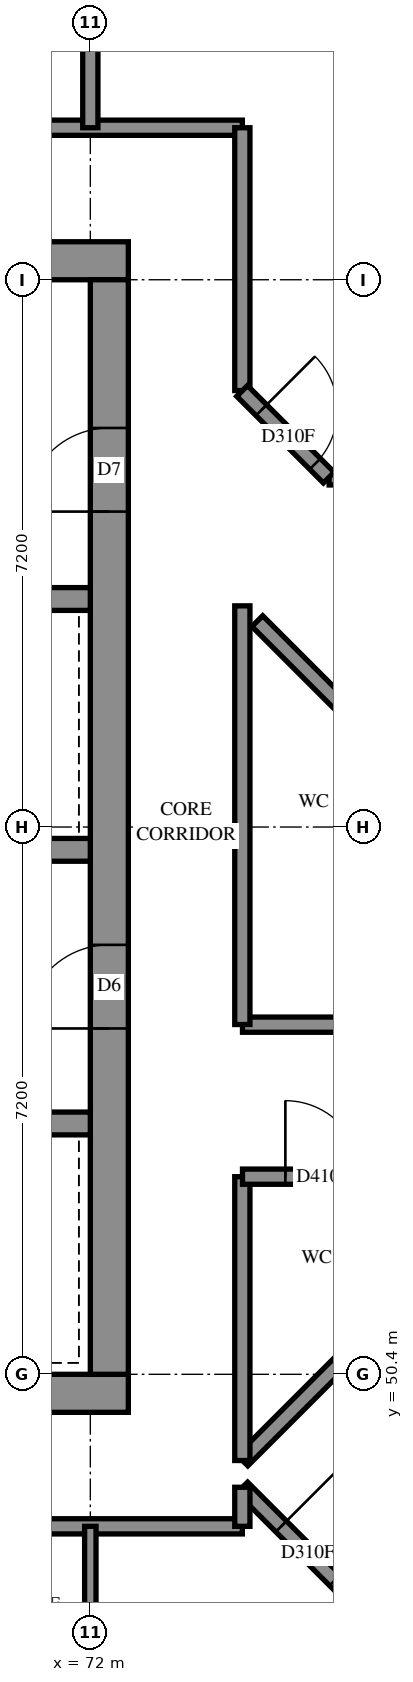
"""IFC4 building model, lengths in metres.
Left out: names, types, materials, properties, quantities, classifications, styles, units other than length and angle.
Written with IfcOpenShell. Run it as: python <this file> out.ifc"""

import sys

from ifc_helpers import new_model, si_unit, direction, frame, frame_2d, origin, place, context, subcontext, project, spatial, rectangle, extrude, element, fill, save


model = new_model("IFC4")
c1 = context("Model", 3, precision=1e-05, world=origin(), true_north=direction((0.0, 1.0)))
c2 = subcontext(c1, "Body", "Model", "MODEL_VIEW")
j1 = project(units=[si_unit("LENGTHUNIT", "METRE"), si_unit("PLANEANGLEUNIT", "RADIAN")], contexts=[c1])
p1 = place(None, origin())
s1 = spatial("IfcSite", under=j1, at=p1, CompositionType="ELEMENT")
p2 = place(p1, origin())
s2 = spatial("IfcBuilding", under=s1, at=p2, CompositionType="ELEMENT")
p3 = place(p2, frame((0.0, 0.0, 193.0)))
s3 = spatial("IfcBuildingStorey", under=s2, at=p3, CompositionType="ELEMENT", Elevation=193.0)
p4 = place(p3, frame((57.1, 50.15, -0.3), z_axis=(0.0, 0.0, 1.0), x_axis=(1.0, 0.0, 0.0)))
e1 = element("IfcWall", 1, at=p4, inside=s3, PredefinedType="SHEAR", context=c2, shape_type="SweptSolid", body=[
    extrude(rectangle(XDim=15.4, YDim=0.5, at=frame_2d((7.7, 0.0))), origin(), (0.0, 0.0, 1.0), 2.7),
])
p5 = place(p3, frame((57.1, 65.05, -0.3), z_axis=(0.0, 0.0, 1.0), x_axis=(1.0, 0.0, 0.0)))
e2 = element("IfcWall", 2, at=p5, inside=s3, PredefinedType="SHEAR", context=c2, shape_type="SweptSolid", body=[
    extrude(rectangle(XDim=15.4, YDim=0.5, at=frame_2d((7.7, 0.0))), origin(), (0.0, 0.0, 1.0), 2.7),
])
p6 = place(p5, frame((10.5, 0.0, 0.3)))
e3 = element("IfcOpeningElement", 3, at=p6, cuts=e2, PredefinedType="OPENING", context=c2, shape_type="SweptSolid", body=[
    extrude(rectangle(XDim=0.8, YDim=2.1, at=frame_2d((0.4, 1.05))), frame((0.0, 0.26, 0.0), z_axis=(0.0, -1.0, 0.0), x_axis=(1.0, 0.0, 0.0)), (0.0, 0.0, 1.0), 0.52),
])
p7 = place(p3, frame((72.25, 50.4, -0.3), z_axis=(0.0, 0.0, 1.0), x_axis=(0.0, 1.0, 0.0)))
e4 = element("IfcWall", 4, at=p7, inside=s3, PredefinedType="SHEAR", context=c2, shape_type="SweptSolid", body=[
    extrude(rectangle(XDim=14.4, YDim=0.5, at=frame_2d((7.2, 0.0))), origin(), (0.0, 0.0, 1.0), 2.7),
])
p8 = place(p7, frame((4.55, 0.0, 0.3)))
e5 = element("IfcOpeningElement", 5, at=p8, cuts=e4, PredefinedType="OPENING", context=c2, shape_type="SweptSolid", body=[
    extrude(rectangle(XDim=1.1, YDim=2.1, at=frame_2d((0.55, 1.05))), frame((0.0, 0.26, 0.0), z_axis=(0.0, -1.0, 0.0), x_axis=(1.0, 0.0, 0.0)), (0.0, 0.0, 1.0), 0.52),
])
p9 = place(p7, frame((11.35, 0.0, 0.3)))
e6 = element("IfcOpeningElement", 6, at=p9, cuts=e4, PredefinedType="OPENING", context=c2, shape_type="SweptSolid", body=[
    extrude(rectangle(XDim=1.1, YDim=2.1, at=frame_2d((0.55, 1.05))), frame((0.0, 0.26, 0.0), z_axis=(0.0, -1.0, 0.0), x_axis=(1.0, 0.0, 0.0)), (0.0, 0.0, 1.0), 0.52),
])
p10 = place(p3, frame((57.6, 53.7, 0.0), z_axis=(0.0, 0.0, 1.0), x_axis=(1.0, 0.0, 0.0)))
e7 = element("IfcWall", 7, at=p10, inside=s3, PredefinedType="SOLIDWALL", context=c2, shape_type="SweptSolid", body=[
    extrude(rectangle(XDim=14.4, YDim=0.3, at=frame_2d((7.2, 0.0))), origin(), (0.0, 0.0, 1.0), 3.1),
])
p11 = place(p10, frame((1.35, 0.0, 0.0)))
e8 = element("IfcOpeningElement", 8, at=p11, cuts=e7, PredefinedType="OPENING", context=c2, shape_type="SweptSolid", body=[
    extrude(rectangle(XDim=0.9, YDim=2.1, at=frame_2d((0.45, 1.05))), frame((0.0, 0.16, 0.0), z_axis=(0.0, -1.0, 0.0), x_axis=(1.0, 0.0, 0.0)), (0.0, 0.0, 1.0), 0.32),
])
p12 = place(p10, frame((4.95, 0.0, 0.0)))
e9 = element("IfcOpeningElement", 9, at=p12, cuts=e7, PredefinedType="OPENING", context=c2, shape_type="SweptSolid", body=[
    extrude(rectangle(XDim=0.9, YDim=2.1, at=frame_2d((0.45, 1.05))), frame((0.0, 0.16, 0.0), z_axis=(0.0, -1.0, 0.0), x_axis=(1.0, 0.0, 0.0)), (0.0, 0.0, 1.0), 0.32),
])
p13 = place(p10, frame((8.55, 0.0, 0.0)))
e10 = element("IfcOpeningElement", 10, at=p13, cuts=e7, PredefinedType="OPENING", context=c2, shape_type="SweptSolid", body=[
    extrude(rectangle(XDim=0.9, YDim=2.1, at=frame_2d((0.45, 1.05))), frame((0.0, 0.16, 0.0), z_axis=(0.0, -1.0, 0.0), x_axis=(1.0, 0.0, 0.0)), (0.0, 0.0, 1.0), 0.32),
])
p14 = place(p10, frame((12.05, 0.0, 0.0)))
e11 = element("IfcOpeningElement", 11, at=p14, cuts=e7, PredefinedType="OPENING", context=c2, shape_type="SweptSolid", body=[
    extrude(rectangle(XDim=1.1, YDim=2.1, at=frame_2d((0.55, 1.05))), frame((0.0, 0.16, 0.0), z_axis=(0.0, -1.0, 0.0), x_axis=(1.0, 0.0, 0.0)), (0.0, 0.0, 1.0), 0.32),
])
p15 = place(p3, frame((57.6, 57.3, 0.0), z_axis=(0.0, 0.0, 1.0), x_axis=(1.0, 0.0, 0.0)))
e12 = element("IfcWall", 12, at=p15, inside=s3, PredefinedType="SOLIDWALL", context=c2, shape_type="SweptSolid", body=[
    extrude(rectangle(XDim=14.4, YDim=0.3, at=frame_2d((7.2, 0.0))), origin(), (0.0, 0.0, 1.0), 3.1),
])
p16 = place(p15, frame((1.25, 0.0, 0.0)))
e13 = element("IfcOpeningElement", 13, at=p16, cuts=e12, PredefinedType="OPENING", context=c2, shape_type="SweptSolid", body=[
    extrude(rectangle(XDim=1.1, YDim=2.1, at=frame_2d((0.55, 1.05))), frame((0.0, 0.16, 0.0), z_axis=(0.0, -1.0, 0.0), x_axis=(1.0, 0.0, 0.0)), (0.0, 0.0, 1.0), 0.32),
])
p17 = place(p15, frame((4.85, 0.0, 0.0)))
e14 = element("IfcOpeningElement", 14, at=p17, cuts=e12, PredefinedType="OPENING", context=c2, shape_type="SweptSolid", body=[
    extrude(rectangle(XDim=1.1, YDim=2.1, at=frame_2d((0.55, 1.05))), frame((0.0, 0.16, 0.0), z_axis=(0.0, -1.0, 0.0), x_axis=(1.0, 0.0, 0.0)), (0.0, 0.0, 1.0), 0.32),
])
p18 = place(p15, frame((8.45, 0.0, 0.0)))
e15 = element("IfcOpeningElement", 15, at=p18, cuts=e12, PredefinedType="OPENING", context=c2, shape_type="SweptSolid", body=[
    extrude(rectangle(XDim=1.1, YDim=2.1, at=frame_2d((0.55, 1.05))), frame((0.0, 0.16, 0.0), z_axis=(0.0, -1.0, 0.0), x_axis=(1.0, 0.0, 0.0)), (0.0, 0.0, 1.0), 0.32),
])
p19 = place(p15, frame((12.05, 0.0, 0.0)))
e16 = element("IfcOpeningElement", 16, at=p19, cuts=e12, PredefinedType="OPENING", context=c2, shape_type="SweptSolid", body=[
    extrude(rectangle(XDim=1.1, YDim=2.1, at=frame_2d((0.55, 1.05))), frame((0.0, 0.16, 0.0), z_axis=(0.0, -1.0, 0.0), x_axis=(1.0, 0.0, 0.0)), (0.0, 0.0, 1.0), 0.32),
])
p20 = place(p3, frame((64.8, 60.6, 0.0), z_axis=(0.0, 0.0, 1.0), x_axis=(1.0, 0.0, 0.0)))
e17 = element("IfcWall", 17, at=p20, inside=s3, PredefinedType="SOLIDWALL", context=c2, shape_type="SweptSolid", body=[
    extrude(rectangle(XDim=7.2, YDim=0.3, at=frame_2d((3.6, 0.0))), origin(), (0.0, 0.0, 1.0), 3.1),
])
p21 = place(p3, frame((55.6, 48.4, 0.0), z_axis=(0.0, 0.0, 1.0), x_axis=(1.0, 0.0, 0.0)))
e18 = element("IfcWall", 18, at=p21, inside=s3, PredefinedType="PARTITIONING", context=c2, shape_type="SweptSolid", body=[
    extrude(rectangle(XDim=18.4, YDim=0.2, at=frame_2d((9.2, 0.0))), origin(), (0.0, 0.0, 1.0), 3.1),
])
p22 = place(p21, frame((5.862, 0.0, 0.0)))
e19 = element("IfcOpeningElement", 19, at=p22, cuts=e18, PredefinedType="OPENING", context=c2, shape_type="SweptSolid", body=[
    extrude(rectangle(XDim=1.0, YDim=2.1, at=frame_2d((0.5, 1.05))), frame((0.0, 0.11, 0.0), z_axis=(0.0, -1.0, 0.0), x_axis=(1.0, 0.0, 0.0)), (0.0, 0.0, 1.0), 0.22),
])
p23 = place(p21, frame((11.5, 0.0, 0.0)))
e20 = element("IfcOpeningElement", 20, at=p23, cuts=e18, PredefinedType="OPENING", context=c2, shape_type="SweptSolid", body=[
    extrude(rectangle(XDim=0.9, YDim=2.1, at=frame_2d((0.45, 1.05))), frame((0.0, 0.11, 0.0), z_axis=(0.0, -1.0, 0.0), x_axis=(1.0, 0.0, 0.0)), (0.0, 0.0, 1.0), 0.22),
])
p24 = place(p21, frame((13.2, 0.0, 0.0)))
e21 = element("IfcOpeningElement", 21, at=p24, cuts=e18, PredefinedType="OPENING", context=c2, shape_type="SweptSolid", body=[
    extrude(rectangle(XDim=0.9, YDim=2.1, at=frame_2d((0.45, 1.05))), frame((0.0, 0.11, 0.0), z_axis=(0.0, -1.0, 0.0), x_axis=(1.0, 0.0, 0.0)), (0.0, 0.0, 1.0), 0.22),
])
p25 = place(p3, frame((55.6, 66.8, 0.0), z_axis=(0.0, 0.0, 1.0), x_axis=(1.0, 0.0, 0.0)))
e22 = element("IfcWall", 22, at=p25, inside=s3, PredefinedType="PARTITIONING", context=c2, shape_type="SweptSolid", body=[
    extrude(rectangle(XDim=18.4, YDim=0.2, at=frame_2d((9.2, 0.0))), origin(), (0.0, 0.0, 1.0), 3.1),
])
p26 = place(p25, frame((5.886, 0.0, 0.0)))
e23 = element("IfcOpeningElement", 23, at=p26, cuts=e22, PredefinedType="OPENING", context=c2, shape_type="SweptSolid", body=[
    extrude(rectangle(XDim=1.0, YDim=2.1, at=frame_2d((0.5, 1.05))), frame((0.0, 0.11, 0.0), z_axis=(0.0, -1.0, 0.0), x_axis=(1.0, 0.0, 0.0)), (0.0, 0.0, 1.0), 0.22),
])
p27 = place(p25, frame((13.389, 0.0, 0.0)))
e24 = element("IfcOpeningElement", 24, at=p27, cuts=e22, PredefinedType="OPENING", context=c2, shape_type="SweptSolid", body=[
    extrude(rectangle(XDim=1.0, YDim=2.1, at=frame_2d((0.5, 1.05))), frame((0.0, 0.11, 0.0), z_axis=(0.0, -1.0, 0.0), x_axis=(1.0, 0.0, 0.0)), (0.0, 0.0, 1.0), 0.22),
])
p28 = place(p3, frame((73.999, 48.911, 0.0), z_axis=(0.0, 0.0, 1.0), x_axis=(0.7071067812, -0.7071067812, 0.0)))
e25 = element("IfcWall", 25, at=p28, inside=s3, PredefinedType="PARTITIONING", context=c2, shape_type="SweptSolid", body=[
    extrude(rectangle(XDim=5.745, YDim=0.2, at=frame_2d((2.872, 0.0))), origin(), (0.0, 0.0, 1.0), 3.1),
])
p29 = place(p28, frame((0.724, 0.0, 0.0)))
e26 = element("IfcOpeningElement", 26, at=p29, cuts=e25, PredefinedType="OPENING", context=c2, shape_type="SweptSolid", body=[
    extrude(rectangle(XDim=1.0, YDim=2.1, at=frame_2d((0.5, 1.05))), frame((0.0, 0.11, 0.0), z_axis=(0.0, -1.0, 0.0), x_axis=(1.0, 0.0, 0.0)), (0.0, 0.0, 1.0), 0.22),
])
p30 = place(p3, frame((74.002, 55.0, 0.0), z_axis=(0.0, 0.0, 1.0), x_axis=(1.0, 0.0, 0.0)))
e27 = element("IfcWall", 27, at=p30, inside=s3, PredefinedType="PARTITIONING", context=c2, shape_type="SweptSolid", body=[
    extrude(rectangle(XDim=5.508, YDim=0.2, at=frame_2d((2.754, 0.0))), origin(), (0.0, 0.0, 1.0), 3.1),
])
p31 = place(p30, frame((1.51, 0.0, 0.0)))
e28 = element("IfcOpeningElement", 28, at=p31, cuts=e27, PredefinedType="OPENING", context=c2, shape_type="SweptSolid", body=[
    extrude(rectangle(XDim=1.0, YDim=2.1, at=frame_2d((0.5, 1.05))), frame((0.0, 0.11, 0.0), z_axis=(0.0, -1.0, 0.0), x_axis=(1.0, 0.0, 0.0)), (0.0, 0.0, 1.0), 0.22),
])
p32 = place(p3, frame((74.0, 55.002, 0.0), z_axis=(0.0, 0.0, 1.0), x_axis=(0.0, 1.0, 0.0)))
e29 = element("IfcWall", 29, at=p32, inside=s3, PredefinedType="PARTITIONING", context=c2, shape_type="SweptSolid", body=[
    extrude(rectangle(XDim=5.508, YDim=0.2, at=frame_2d((2.754, 0.0))), origin(), (0.0, 0.0, 1.0), 3.1),
])
p33 = place(p3, frame((74.001, 49.267, 0.0), z_axis=(0.0, 0.0, 1.0), x_axis=(0.7071067812, 0.7071067812, 0.0)))
e30 = element("IfcWall", 30, at=p33, inside=s3, PredefinedType="PARTITIONING", context=c2, shape_type="SweptSolid", body=[
    extrude(rectangle(XDim=5.278, YDim=0.2, at=frame_2d((2.639, 0.0))), origin(), (0.0, 0.0, 1.0), 3.1),
])
p34 = place(p3, frame((74.197, 60.309, 0.0), z_axis=(0.0, 0.0, 1.0), x_axis=(0.7071067812, -0.7071067812, 0.0)))
e31 = element("IfcWall", 31, at=p34, inside=s3, PredefinedType="PARTITIONING", context=c2, shape_type="SweptSolid", body=[
    extrude(rectangle(XDim=4.738, YDim=0.2, at=frame_2d((2.369, 0.0))), origin(), (0.0, 0.0, 1.0), 3.1),
])
p35 = place(p3, frame((72.0, 66.8, 0.0), z_axis=(0.0, 0.0, 1.0), x_axis=(0.0, 1.0, 0.0)))
e32 = element("IfcWall", 32, at=p35, inside=s3, PredefinedType="PARTITIONING", context=c2, shape_type="SweptSolid", body=[
    extrude(rectangle(XDim=4.696, YDim=0.2, at=frame_2d((2.348, 0.0))), origin(), (0.0, 0.0, 1.0), 3.1),
])
p36 = place(p3, frame((75.142, 62.2, 0.0), z_axis=(0.0, 0.0, 1.0), x_axis=(1.0, 0.0, 0.0)))
e33 = element("IfcWall", 33, at=p36, inside=s3, PredefinedType="PARTITIONING", context=c2, shape_type="SweptSolid", body=[
    extrude(rectangle(XDim=4.058, YDim=0.2, at=frame_2d((2.029, 0.0))), origin(), (0.0, 0.0, 1.0), 3.1),
])
p37 = place(p36, frame((2.808, 0.0, 0.0)))
e34 = element("IfcOpeningElement", 34, at=p37, cuts=e33, PredefinedType="OPENING", context=c2, shape_type="SweptSolid", body=[
    extrude(rectangle(XDim=0.9, YDim=2.1, at=frame_2d((0.45, 1.05))), frame((0.0, 0.11, 0.0), z_axis=(0.0, -1.0, 0.0), x_axis=(1.0, 0.0, 0.0)), (0.0, 0.0, 1.0), 0.22),
])
p38 = place(p3, frame((74.0, 49.266, 0.0), z_axis=(0.0, 0.0, 1.0), x_axis=(0.0, 1.0, 0.0)))
e35 = element("IfcWall", 35, at=p38, inside=s3, PredefinedType="PARTITIONING", context=c2, shape_type="SweptSolid", body=[
    extrude(rectangle(XDim=3.734, YDim=0.2, at=frame_2d((1.867, 0.0))), origin(), (0.0, 0.0, 1.0), 3.1),
])
p39 = place(p3, frame((74.002, 53.0, 0.0), z_axis=(0.0, 0.0, 1.0), x_axis=(1.0, 0.0, 0.0)))
e36 = element("IfcWall", 36, at=p39, inside=s3, PredefinedType="PARTITIONING", context=c2, shape_type="SweptSolid", body=[
    extrude(rectangle(XDim=3.732, YDim=0.2, at=frame_2d((1.866, 0.0))), origin(), (0.0, 0.0, 1.0), 3.1),
])
p40 = place(p39, frame((0.564, 0.0, 0.0)))
e37 = element("IfcOpeningElement", 37, at=p40, cuts=e36, PredefinedType="OPENING", context=c2, shape_type="SweptSolid", body=[
    extrude(rectangle(XDim=1.0, YDim=2.1, at=frame_2d((0.5, 1.05))), frame((0.0, 0.11, 0.0), z_axis=(0.0, -1.0, 0.0), x_axis=(1.0, 0.0, 0.0)), (0.0, 0.0, 1.0), 0.22),
])
p41 = place(p3, frame((74.0, 63.342, 0.0), z_axis=(0.0, 0.0, 1.0), x_axis=(0.0, 1.0, 0.0)))
e38 = element("IfcWall", 38, at=p41, inside=s3, PredefinedType="PARTITIONING", context=c2, shape_type="SweptSolid", body=[
    extrude(rectangle(XDim=3.458, YDim=0.2, at=frame_2d((1.729, 0.0))), origin(), (0.0, 0.0, 1.0), 3.1),
])
p42 = place(p3, frame((72.0, 46.0, 0.0), z_axis=(0.0, 0.0, 1.0), x_axis=(0.0, 1.0, 0.0)))
e39 = element("IfcWall", 39, at=p42, inside=s3, PredefinedType="PARTITIONING", context=c2, shape_type="SweptSolid", body=[
    extrude(rectangle(XDim=2.4, YDim=0.15, at=frame_2d((1.2, 0.0))), origin(), (0.0, 0.0, 1.0), 3.1),
])
p43 = place(p3, frame((73.997, 63.337, 0.0), z_axis=(0.0, 0.0, 1.0), x_axis=(0.7071067812, -0.7071067812, 0.0)))
e40 = element("IfcWall", 40, at=p43, inside=s3, PredefinedType="PARTITIONING", context=c2, shape_type="SweptSolid", body=[
    extrude(rectangle(XDim=1.612, YDim=0.2, at=frame_2d((0.806, 0.0))), origin(), (0.0, 0.0, 1.0), 3.1),
])
p44 = place(p43, frame((0.357, 0.0, 0.0)))
e41 = element("IfcOpeningElement", 41, at=p44, cuts=e40, PredefinedType="OPENING", context=c2, shape_type="SweptSolid", body=[
    extrude(rectangle(XDim=1.0, YDim=2.1, at=frame_2d((0.5, 1.05))), frame((0.0, 0.11, 0.0), z_axis=(0.0, -1.0, 0.0), x_axis=(1.0, 0.0, 0.0)), (0.0, 0.0, 1.0), 0.22),
])
p45 = place(p3, frame((74.0, 48.4, 0.0), z_axis=(0.0, 0.0, 1.0), x_axis=(0.0, 1.0, 0.0)))
e42 = element("IfcWall", 42, at=p45, inside=s3, PredefinedType="PARTITIONING", context=c2, shape_type="SweptSolid", body=[
    extrude(rectangle(XDim=0.514, YDim=0.2, at=frame_2d((0.257, 0.0))), origin(), (0.0, 0.0, 1.0), 3.1),
])
p46 = place(p8, origin())
e43 = element("IfcDoor", 43, at=p46, inside=s3, OperationType="DOUBLE_DOOR_SINGLE_SWING", PredefinedType="DOOR", context=c2, shape_type="SweptSolid", body=[
    extrude(rectangle(XDim=1.1, YDim=2.1, at=frame_2d((0.55, 1.05))), frame((0.0, 0.025, 0.0), z_axis=(0.0, -1.0, 0.0), x_axis=(1.0, 0.0, 0.0)), (0.0, 0.0, 1.0), 0.05),
])
fill(e5, e43)
p47 = place(p9, origin())
e44 = element("IfcDoor", 44, at=p47, inside=s3, OperationType="SINGLE_SWING_RIGHT", PredefinedType="DOOR", context=c2, shape_type="SweptSolid", body=[
    extrude(rectangle(XDim=1.1, YDim=2.1, at=frame_2d((0.55, 1.05))), frame((0.0, 0.025, 0.0), z_axis=(0.0, -1.0, 0.0), x_axis=(1.0, 0.0, 0.0)), (0.0, 0.0, 1.0), 0.05),
])
fill(e6, e44)
p48 = place(p40, origin())
e45 = element("IfcDoor", 45, at=p48, inside=s3, OperationType="SINGLE_SWING_RIGHT", PredefinedType="DOOR", context=c2, shape_type="SweptSolid", body=[
    extrude(rectangle(XDim=1.0, YDim=2.1, at=frame_2d((0.5, 1.05))), frame((0.0, 0.025, 0.0), z_axis=(0.0, -1.0, 0.0), x_axis=(1.0, 0.0, 0.0)), (0.0, 0.0, 1.0), 0.05),
])
fill(e37, e45)
p49 = place(p44, origin())
e46 = element("IfcDoor", 46, at=p49, inside=s3, OperationType="SINGLE_SWING_RIGHT", PredefinedType="DOOR", context=c2, shape_type="SweptSolid", body=[
    extrude(rectangle(XDim=1.0, YDim=2.1, at=frame_2d((0.5, 1.05))), frame((0.0, 0.025, 0.0), z_axis=(0.0, -1.0, 0.0), x_axis=(1.0, 0.0, 0.0)), (0.0, 0.0, 1.0), 0.05),
])
fill(e41, e46)
p50 = place(p29, origin())
e47 = element("IfcDoor", 47, at=p50, inside=s3, OperationType="SINGLE_SWING_LEFT", PredefinedType="DOOR", context=c2, shape_type="SweptSolid", body=[
    extrude(rectangle(XDim=1.0, YDim=2.1, at=frame_2d((0.5, 1.05))), frame((0.0, 0.025, 0.0), z_axis=(0.0, -1.0, 0.0), x_axis=(1.0, 0.0, 0.0)), (0.0, 0.0, 1.0), 0.05),
])
fill(e26, e47)
save(model, sys.argv[1])
